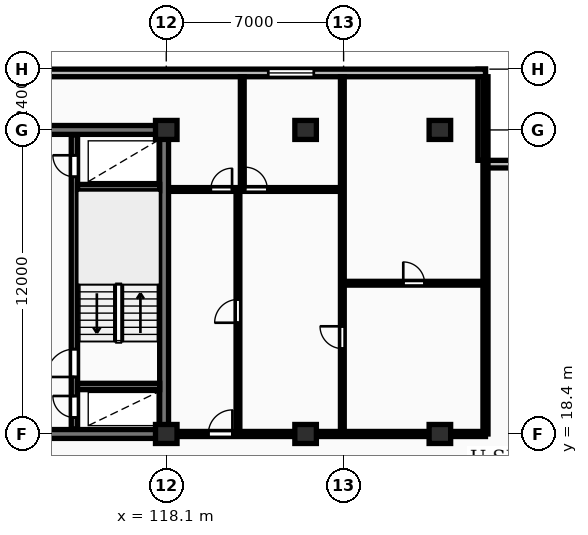
"""IFC4 building model, lengths in metres.
Left out: names, types, materials, properties, quantities, classifications, styles, units other than length and angle.
Written with IfcOpenShell. Run it as: python <this file> out.ifc"""

import sys

from ifc_helpers import new_model, si_unit, direction, frame, frame_2d, origin, origin_2d, place, context, subcontext, project, spatial, rectangle, extrude, element, fill, save


model = new_model("IFC4")
c1 = context("Model", 3, precision=1e-05, world=origin(), true_north=direction((0.0, 1.0)))
c2 = subcontext(c1, "Body", "Model", "MODEL_VIEW")
j1 = project(units=[si_unit("LENGTHUNIT", "METRE"), si_unit("PLANEANGLEUNIT", "RADIAN")], contexts=[c1])
p1 = place(None, origin())
s1 = spatial("IfcSite", under=j1, at=p1, CompositionType="ELEMENT")
p2 = place(p1, origin())
s2 = spatial("IfcBuilding", under=s1, at=p2, CompositionType="ELEMENT")
p3 = place(p2, frame((0.0, 0.0, 93.8)))
s3 = spatial("IfcBuildingStorey", under=s2, at=p3, CompositionType="ELEMENT", Elevation=93.8)
for number, where, z_axis, x_axis in (
    (1, (118.1, 18.4, 0.0), (0.0, 0.0, 1.0), (1.0, 0.0, 0.0)),
    (2, (118.1, 30.4, 0.0), (0.0, 0.0, 1.0), (1.0, 0.0, 0.0)),
    (3, (123.6, 18.4, 0.0), (0.0, 0.0, 1.0), (1.0, 0.0, 0.0)),
    (4, (123.6, 30.4, 0.0), (0.0, 0.0, 1.0), (1.0, 0.0, 0.0)),
    (5, (128.9, 18.4, 0.0), (0.0, 0.0, 1.0), (1.0, 0.0, 0.0)),
    (6, (128.9, 30.4, 0.0), (0.0, 0.0, 1.0), (1.0, 0.0, 0.0)),
):
    element("IfcColumn", number, at=place(p3, frame(where, z_axis=z_axis, x_axis=x_axis)), inside=s3, PredefinedType="COLUMN", context=c2, shape_type="SweptSolid", body=[
        extrude(rectangle(XDim=0.85, YDim=0.75, at=origin_2d()), origin(), (0.0, 0.0, 1.0), 3.25),
    ])
for number, where, z_axis, x_axis in (
    (7, (134.3, 29.05, 0.0), (0.0, 0.0, 1.0), (-1.0, 0.0, 0.0)),
    (8, (130.55, 29.2, 0.0), (0.0, 0.0, 1.0), (0.0, 1.0, 0.0)),
):
    element("IfcWall", number, at=place(p3, frame(where, z_axis=z_axis, x_axis=x_axis)), inside=s3, PredefinedType="STANDARD", context=c2, shape_type="SweptSolid", body=[
        extrude(rectangle(XDim=3.6, YDim=0.3, at=frame_2d((1.8, 0.0))), origin(), (0.0, 0.0, 1.0), 2.97),
    ])
p4 = place(p3, frame((130.7, 32.65, 0.0), z_axis=(0.0, 0.0, 1.0), x_axis=(-1.0, 0.0, 0.0)))
e9 = element("IfcWall", 9, at=p4, inside=s3, PredefinedType="STANDARD", context=c2, shape_type="SweptSolid", body=[
    extrude(rectangle(XDim=58.0, YDim=0.3, at=frame_2d((29.0, 0.0))), origin(), (0.0, 0.0, 1.0), 2.97),
])
p5 = place(p4, frame((50.125, 0.0, 0.85)))
e10 = element("IfcOpeningElement", 10, at=p5, cuts=e9, PredefinedType="OPENING", context=c2, shape_type="SweptSolid", body=[
    extrude(rectangle(XDim=1.8, YDim=1.8, at=frame_2d((0.9, 0.9))), frame((0.0, 0.16, 0.0), z_axis=(0.0, -1.0, 0.0), x_axis=(1.0, 0.0, 0.0)), (0.0, 0.0, 1.0), 0.32),
])
p6 = place(p4, frame((6.775, 0.0, 0.85)))
e11 = element("IfcOpeningElement", 11, at=p6, cuts=e9, PredefinedType="OPENING", context=c2, shape_type="SweptSolid", body=[
    extrude(rectangle(XDim=1.8, YDim=1.8, at=frame_2d((0.9, 0.9))), frame((0.0, 0.16, 0.0), z_axis=(0.0, -1.0, 0.0), x_axis=(1.0, 0.0, 0.0)), (0.0, 0.0, 1.0), 0.32),
])
p7 = place(p3, frame((81.925, 30.4, 0.0), z_axis=(0.0, 0.0, 1.0), x_axis=(1.0, 0.0, 0.0)))
e12 = element("IfcWall", 12, at=p7, inside=s3, PredefinedType="SHEAR", context=c2, shape_type="SweptSolid", body=[
    extrude(rectangle(XDim=36.265, YDim=0.35, at=frame_2d((18.132, 0.0))), origin(), (0.0, 0.0, 1.0), 3.25),
])
p8 = place(p3, frame((118.015, 18.575, 0.0), z_axis=(0.0, 0.0, 1.0), x_axis=(0.0, 1.0, 0.0)))
e13 = element("IfcWall", 13, at=p8, inside=s3, PredefinedType="SHEAR", context=c2, shape_type="SweptSolid", body=[
    extrude(rectangle(XDim=11.65, YDim=0.35, at=frame_2d((5.825, 0.0))), origin(), (0.0, 0.0, 1.0), 3.25),
])
p9 = place(p3, frame((81.925, 18.4, 0.0), z_axis=(0.0, 0.0, 1.0), x_axis=(1.0, 0.0, 0.0)))
e14 = element("IfcWall", 14, at=p9, inside=s3, PredefinedType="SHEAR", context=c2, shape_type="SweptSolid", body=[
    extrude(rectangle(XDim=36.265, YDim=0.35, at=frame_2d((18.132, 0.0))), origin(), (0.0, 0.0, 1.0), 3.25),
])
p10 = place(p9, frame((5.675, 0.0, 0.0)))
e15 = element("IfcOpeningElement", 15, at=p10, cuts=e14, PredefinedType="OPENING", context=c2, shape_type="SweptSolid", body=[
    extrude(rectangle(XDim=1.0, YDim=2.15, at=frame_2d((0.5, 1.075))), frame((0.0, 0.185, 0.0), z_axis=(0.0, -1.0, 0.0), x_axis=(1.0, 0.0, 0.0)), (0.0, 0.0, 1.0), 0.37),
])
p11 = place(p9, frame((21.925, 0.0, 0.0)))
e16 = element("IfcOpeningElement", 16, at=p11, cuts=e14, PredefinedType="OPENING", context=c2, shape_type="SweptSolid", body=[
    extrude(rectangle(XDim=1.5, YDim=2.2, at=frame_2d((0.75, 1.1))), frame((0.0, 0.185, 0.0), z_axis=(0.0, -1.0, 0.0), x_axis=(1.0, 0.0, 0.0)), (0.0, 0.0, 1.0), 0.37),
])
p12 = place(p9, frame((29.875, 0.0, 0.0)))
e17 = element("IfcOpeningElement", 17, at=p12, cuts=e14, PredefinedType="OPENING", context=c2, shape_type="SweptSolid", body=[
    extrude(rectangle(XDim=1.0, YDim=2.15, at=frame_2d((0.5, 1.075))), frame((0.0, 0.185, 0.0), z_axis=(0.0, -1.0, 0.0), x_axis=(1.0, 0.0, 0.0)), (0.0, 0.0, 1.0), 0.37),
])
p13 = place(p3, frame((114.475, 18.6, 0.0), z_axis=(0.0, 0.0, 1.0), x_axis=(0.0, 1.0, 0.0)))
e18 = element("IfcWall", 18, at=p13, inside=s3, PredefinedType="SHEAR", context=c2, shape_type="SweptSolid", body=[
    extrude(rectangle(XDim=11.6, YDim=0.25, at=frame_2d((5.8, 0.0))), origin(), (0.0, 0.0, 1.0), 3.25),
])
p14 = place(p13, frame((0.45, 0.0, 0.0)))
e19 = element("IfcOpeningElement", 19, at=p14, cuts=e18, PredefinedType="OPENING", context=c2, shape_type="SweptSolid", body=[
    extrude(rectangle(XDim=0.85, YDim=2.05, at=frame_2d((0.425, 1.025))), frame((0.0, 0.135, 0.0), z_axis=(0.0, -1.0, 0.0), x_axis=(1.0, 0.0, 0.0)), (0.0, 0.0, 1.0), 0.27),
])
p15 = place(p13, frame((2.05, 0.0, 0.0)))
e20 = element("IfcOpeningElement", 20, at=p15, cuts=e18, PredefinedType="OPENING", context=c2, shape_type="SweptSolid", body=[
    extrude(rectangle(XDim=1.1, YDim=2.1, at=frame_2d((0.55, 1.05))), frame((0.0, 0.135, 0.0), z_axis=(0.0, -1.0, 0.0), x_axis=(1.0, 0.0, 0.0)), (0.0, 0.0, 1.0), 0.27),
])
p16 = place(p13, frame((9.95, 0.0, 0.0)))
e21 = element("IfcOpeningElement", 21, at=p16, cuts=e18, PredefinedType="OPENING", context=c2, shape_type="SweptSolid", body=[
    extrude(rectangle(XDim=0.85, YDim=2.05, at=frame_2d((0.425, 1.025))), frame((0.0, 0.135, 0.0), z_axis=(0.0, -1.0, 0.0), x_axis=(1.0, 0.0, 0.0)), (0.0, 0.0, 1.0), 0.27),
])
for number, where, z_axis, x_axis in (
    (22, (114.6, 20.275, 0.0), (0.0, 0.0, 1.0), (1.0, 0.0, 0.0)),
    (23, (114.6, 28.125, 0.0), (0.0, 0.0, 1.0), (1.0, 0.0, 0.0)),
):
    element("IfcWall", number, at=place(p3, frame(where, z_axis=z_axis, x_axis=x_axis)), inside=s3, PredefinedType="SHEAR", context=c2, shape_type="SweptSolid", body=[
        extrude(rectangle(XDim=3.24, YDim=0.25, at=frame_2d((1.62, 0.0))), origin(), (0.0, 0.0, 1.0), 3.25),
    ])
p17 = place(p3, frame((130.7, 18.4, 0.0), z_axis=(0.0, 0.0, 1.0), x_axis=(0.0, 1.0, 0.0)))
e24 = element("IfcWall", 24, at=p17, inside=s3, PredefinedType="PARTITIONING", context=c2, shape_type="SweptSolid", body=[
    extrude(rectangle(XDim=14.1, YDim=0.2, at=frame_2d((7.05, 0.0))), origin(), (0.0, 0.0, 1.0), 2.97),
])
p18 = place(p3, frame((125.05, 24.35, 0.0), z_axis=(0.0, 0.0, 1.0), x_axis=(1.0, 0.0, 0.0)))
e25 = element("IfcWall", 25, at=p18, inside=s3, PredefinedType="PARTITIONING", context=c2, shape_type="SweptSolid", body=[
    extrude(rectangle(XDim=5.65, YDim=0.15, at=frame_2d((2.825, 0.0))), origin(), (0.0, 0.0, 1.0), 2.97),
])
p19 = place(p18, frame((2.405, 0.0, 0.0)))
e26 = element("IfcOpeningElement", 26, at=p19, cuts=e25, PredefinedType="OPENING", context=c2, shape_type="SweptSolid", body=[
    extrude(rectangle(XDim=0.84, YDim=2.04, at=frame_2d((0.42, 1.02))), frame((0.0, 0.085, 0.0), z_axis=(0.0, -1.0, 0.0), x_axis=(1.0, 0.0, 0.0)), (0.0, 0.0, 1.0), 0.17),
])
p20 = place(p3, frame((125.05, 18.45, 0.0), z_axis=(0.0, 0.0, 1.0), x_axis=(0.0, 1.0, 0.0)))
e27 = element("IfcWall", 27, at=p20, inside=s3, PredefinedType="PARTITIONING", context=c2, shape_type="SweptSolid", body=[
    extrude(rectangle(XDim=14.05, YDim=0.15, at=frame_2d((7.025, 0.0))), origin(), (0.0, 0.0, 1.0), 2.97),
])
p21 = place(p20, frame((3.32, 0.0, 0.0)))
e28 = element("IfcOpeningElement", 28, at=p21, cuts=e27, PredefinedType="OPENING", context=c2, shape_type="SweptSolid", body=[
    extrude(rectangle(XDim=0.88, YDim=2.06, at=frame_2d((0.44, 1.03))), frame((0.0, 0.085, 0.0), z_axis=(0.0, -1.0, 0.0), x_axis=(1.0, 0.0, 0.0)), (0.0, 0.0, 1.0), 0.17),
])
p22 = place(p3, frame((120.93, 18.45, 0.0), z_axis=(0.0, 0.0, 1.0), x_axis=(0.0, 1.0, 0.0)))
e29 = element("IfcWall", 29, at=p22, inside=s3, PredefinedType="PARTITIONING", context=c2, shape_type="SweptSolid", body=[
    extrude(rectangle(XDim=9.6, YDim=0.15, at=frame_2d((4.8, 0.0))), origin(), (0.0, 0.0, 1.0), 2.97),
])
p23 = place(p22, frame((4.34, 0.0, 0.0)))
e30 = element("IfcOpeningElement", 30, at=p23, cuts=e29, PredefinedType="OPENING", context=c2, shape_type="SweptSolid", body=[
    extrude(rectangle(XDim=0.92, YDim=2.08, at=frame_2d((0.46, 1.04))), frame((0.0, 0.085, 0.0), z_axis=(0.0, -1.0, 0.0), x_axis=(1.0, 0.0, 0.0)), (0.0, 0.0, 1.0), 0.17),
])
p24 = place(p3, frame((121.1, 28.05, 0.0), z_axis=(0.0, 0.0, 1.0), x_axis=(0.0, 1.0, 0.0)))
e31 = element("IfcWall", 31, at=p24, inside=s3, PredefinedType="PARTITIONING", context=c2, shape_type="SweptSolid", body=[
    extrude(rectangle(XDim=4.45, YDim=0.15, at=frame_2d((2.225, 0.0))), origin(), (0.0, 0.0, 1.0), 2.97),
])
p25 = place(p3, frame((118.27, 28.05, 0.0), z_axis=(0.0, 0.0, 1.0), x_axis=(1.0, 0.0, 0.0)))
e32 = element("IfcWall", 32, at=p25, inside=s3, PredefinedType="PARTITIONING", context=c2, shape_type="SweptSolid", body=[
    extrude(rectangle(XDim=6.76, YDim=0.15, at=frame_2d((3.38, 0.0))), origin(), (0.0, 0.0, 1.0), 2.97),
])
p26 = place(p25, frame((1.587, 0.0, 0.0)))
e33 = element("IfcOpeningElement", 33, at=p26, cuts=e32, PredefinedType="OPENING", context=c2, shape_type="SweptSolid", body=[
    extrude(rectangle(XDim=0.84, YDim=2.04, at=frame_2d((0.42, 1.02))), frame((0.0, 0.085, 0.0), z_axis=(0.0, -1.0, 0.0), x_axis=(1.0, 0.0, 0.0)), (0.0, 0.0, 1.0), 0.17),
])
p27 = place(p25, frame((2.94, 0.0, 0.0)))
e34 = element("IfcOpeningElement", 34, at=p27, cuts=e32, PredefinedType="OPENING", context=c2, shape_type="SweptSolid", body=[
    extrude(rectangle(XDim=0.88, YDim=2.06, at=frame_2d((0.44, 1.03))), frame((0.0, 0.085, 0.0), z_axis=(0.0, -1.0, 0.0), x_axis=(1.0, 0.0, 0.0)), (0.0, 0.0, 1.0), 0.17),
])
p28 = place(p3, frame((118.25, 18.4, 0.0), z_axis=(0.0, 0.0, 1.0), x_axis=(1.0, 0.0, 0.0)))
e35 = element("IfcWall", 35, at=p28, inside=s3, PredefinedType="PARTITIONING", context=c2, shape_type="SweptSolid", body=[
    extrude(rectangle(XDim=12.45, YDim=0.2, at=frame_2d((6.225, 0.0))), origin(), (0.0, 0.0, 1.0), 2.358),
])
p29 = place(p28, frame((1.51, 0.0, 0.0)))
e36 = element("IfcOpeningElement", 36, at=p29, cuts=e35, PredefinedType="OPENING", context=c2, shape_type="SweptSolid", body=[
    extrude(rectangle(XDim=0.95, YDim=2.15, at=frame_2d((0.475, 1.075))), frame((0.0, 0.11, 0.0), z_axis=(0.0, -1.0, 0.0), x_axis=(1.0, 0.0, 0.0)), (0.0, 0.0, 1.0), 0.22),
])
p30 = place(p6, origin())
e37 = element("IfcWindow", 37, at=p30, inside=s3, PartitioningType="SINGLE_PANEL", PredefinedType="WINDOW", context=c2, shape_type="SweptSolid", body=[
    extrude(rectangle(XDim=1.8, YDim=1.8, at=frame_2d((0.9, 0.9))), frame((0.0, 0.03, 0.0), z_axis=(0.0, -1.0, 0.0), x_axis=(1.0, 0.0, 0.0)), (0.0, 0.0, 1.0), 0.06),
])
fill(e11, e37)
p31 = place(p14, origin())
e38 = element("IfcDoor", 38, at=p31, inside=s3, OperationType="SINGLE_SWING_RIGHT", PredefinedType="DOOR", context=c2, shape_type="SweptSolid", body=[
    extrude(rectangle(XDim=0.85, YDim=2.05, at=frame_2d((0.425, 1.025))), frame((0.0, 0.025, 0.0), z_axis=(0.0, -1.0, 0.0), x_axis=(1.0, 0.0, 0.0)), (0.0, 0.0, 1.0), 0.05),
])
fill(e19, e38)
p32 = place(p15, origin())
e39 = element("IfcDoor", 39, at=p32, inside=s3, OperationType="SINGLE_SWING_LEFT", PredefinedType="DOOR", context=c2, shape_type="SweptSolid", body=[
    extrude(rectangle(XDim=1.1, YDim=2.1, at=frame_2d((0.55, 1.05))), frame((0.0, 0.025, 0.0), z_axis=(0.0, -1.0, 0.0), x_axis=(1.0, 0.0, 0.0)), (0.0, 0.0, 1.0), 0.05),
])
fill(e20, e39)
p33 = place(p16, origin())
e40 = element("IfcDoor", 40, at=p33, inside=s3, OperationType="SINGLE_SWING_RIGHT", PredefinedType="DOOR", context=c2, shape_type="SweptSolid", body=[
    extrude(rectangle(XDim=0.85, YDim=2.05, at=frame_2d((0.425, 1.025))), frame((0.0, 0.025, 0.0), z_axis=(0.0, -1.0, 0.0), x_axis=(1.0, 0.0, 0.0)), (0.0, 0.0, 1.0), 0.05),
])
fill(e21, e40)
p34 = place(p19, origin())
e41 = element("IfcDoor", 41, at=p34, inside=s3, OperationType="SINGLE_SWING_LEFT", PredefinedType="DOOR", context=c2, shape_type="SweptSolid", body=[
    extrude(rectangle(XDim=0.84, YDim=2.04, at=frame_2d((0.42, 1.02))), frame((0.0, 0.025, 0.0), z_axis=(0.0, -1.0, 0.0), x_axis=(1.0, 0.0, 0.0)), (0.0, 0.0, 1.0), 0.05),
])
fill(e26, e41)
p35 = place(p21, origin())
e42 = element("IfcDoor", 42, at=p35, inside=s3, OperationType="SINGLE_SWING_RIGHT", PredefinedType="DOOR", context=c2, shape_type="SweptSolid", body=[
    extrude(rectangle(XDim=0.88, YDim=2.06, at=frame_2d((0.44, 1.03))), frame((0.0, 0.025, 0.0), z_axis=(0.0, -1.0, 0.0), x_axis=(1.0, 0.0, 0.0)), (0.0, 0.0, 1.0), 0.05),
])
fill(e28, e42)
p36 = place(p23, origin())
e43 = element("IfcDoor", 43, at=p36, inside=s3, OperationType="SINGLE_SWING_LEFT", PredefinedType="DOOR", context=c2, shape_type="SweptSolid", body=[
    extrude(rectangle(XDim=0.92, YDim=2.08, at=frame_2d((0.46, 1.04))), frame((0.0, 0.025, 0.0), z_axis=(0.0, -1.0, 0.0), x_axis=(1.0, 0.0, 0.0)), (0.0, 0.0, 1.0), 0.05),
])
fill(e30, e43)
p37 = place(p26, origin())
e44 = element("IfcDoor", 44, at=p37, inside=s3, OperationType="SINGLE_SWING_RIGHT", PredefinedType="DOOR", context=c2, shape_type="SweptSolid", body=[
    extrude(rectangle(XDim=0.84, YDim=2.04, at=frame_2d((0.42, 1.02))), frame((0.0, 0.025, 0.0), z_axis=(0.0, -1.0, 0.0), x_axis=(1.0, 0.0, 0.0)), (0.0, 0.0, 1.0), 0.05),
])
fill(e33, e44)
p38 = place(p27, origin())
e45 = element("IfcDoor", 45, at=p38, inside=s3, OperationType="SINGLE_SWING_LEFT", PredefinedType="DOOR", context=c2, shape_type="SweptSolid", body=[
    extrude(rectangle(XDim=0.88, YDim=2.06, at=frame_2d((0.44, 1.03))), frame((0.0, 0.025, 0.0), z_axis=(0.0, -1.0, 0.0), x_axis=(1.0, 0.0, 0.0)), (0.0, 0.0, 1.0), 0.05),
])
fill(e34, e45)
p39 = place(p29, origin())
e46 = element("IfcDoor", 46, at=p39, inside=s3, OperationType="SINGLE_SWING_RIGHT", PredefinedType="DOOR", context=c2, shape_type="SweptSolid", body=[
    extrude(rectangle(XDim=0.95, YDim=2.15, at=frame_2d((0.475, 1.075))), frame((0.0, 0.025, 0.0), z_axis=(0.0, -1.0, 0.0), x_axis=(1.0, 0.0, 0.0)), (0.0, 0.0, 1.0), 0.05),
])
fill(e36, e46)
save(model, sys.argv[1])
